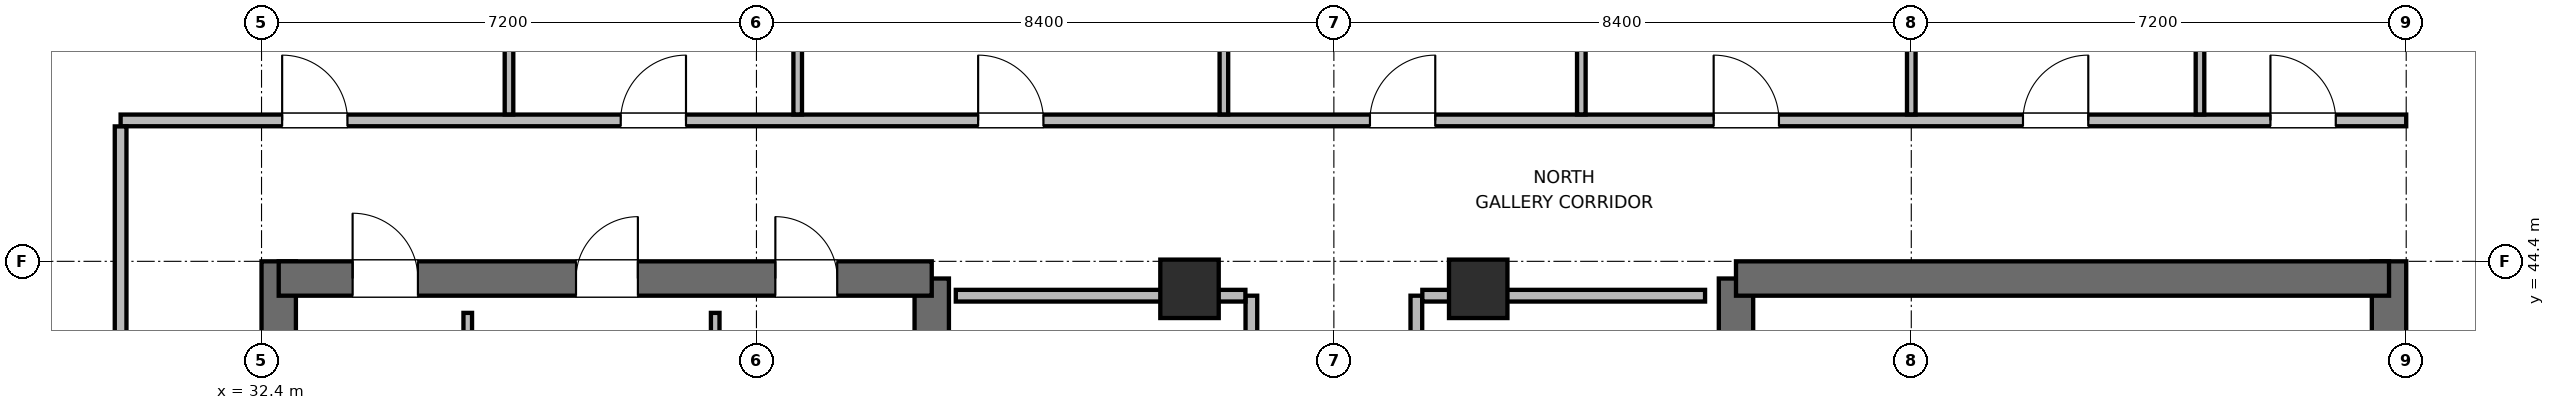
"""IFC4 building model, lengths in metres.
Left out: names, types, materials, properties, quantities, classifications, styles, units other than length and angle.
Written with IfcOpenShell. Run it as: python <this file> out.ifc"""

import sys

from ifc_helpers import new_model, si_unit, direction, frame, frame_2d, origin, origin_2d, place, context, subcontext, project, spatial, rectangle, extrude, element, fill, save


model = new_model("IFC4")
c1 = context("Model", 3, precision=1e-05, world=origin(), true_north=direction((0.0, 1.0)))
c2 = subcontext(c1, "Body", "Model", "MODEL_VIEW")
j1 = project(units=[si_unit("LENGTHUNIT", "METRE"), si_unit("PLANEANGLEUNIT", "RADIAN")], contexts=[c1])
p1 = place(None, origin())
s1 = spatial("IfcSite", under=j1, at=p1, CompositionType="ELEMENT")
p2 = place(p1, origin())
s2 = spatial("IfcBuilding", under=s1, at=p2, CompositionType="ELEMENT")
p3 = place(p2, frame((0.0, 0.0, 278.4)))
s3 = spatial("IfcBuildingStorey", under=s2, at=p3, CompositionType="ELEMENT", Elevation=278.4)
p4 = place(p3, frame((32.65, 27.6, 0.0), z_axis=(0.0, 0.0, 1.0), x_axis=(0.0, 1.0, 0.0)))
e1 = element("IfcWall", 1, at=p4, inside=s3, PredefinedType="SHEAR", context=c2, shape_type="SweptSolid", body=[
    extrude(rectangle(XDim=16.8, YDim=0.5, at=frame_2d((8.4, 0.0))), origin(), (0.0, 0.0, 1.0), 3.9),
])
p5 = place(p3, frame((42.15, 37.8, 0.0), z_axis=(0.0, 0.0, 1.0), x_axis=(0.0, 1.0, 0.0)))
e2 = element("IfcWall", 2, at=p5, inside=s3, PredefinedType="SHEAR", context=c2, shape_type="SweptSolid", body=[
    extrude(rectangle(XDim=6.35, YDim=0.5, at=frame_2d((3.175, 0.0))), origin(), (0.0, 0.0, 1.0), 3.9),
])
p6 = place(p3, frame((32.65, 44.15, 0.0), z_axis=(0.0, 0.0, 1.0), x_axis=(1.0, 0.0, 0.0)))
e3 = element("IfcWall", 3, at=p6, inside=s3, PredefinedType="SHEAR", context=c2, shape_type="SweptSolid", body=[
    extrude(rectangle(XDim=9.5, YDim=0.5, at=frame_2d((4.75, 0.0))), origin(), (0.0, 0.0, 1.0), 3.9),
])
p7 = place(p6, frame((1.075, 0.0, 0.0)))
e4 = element("IfcOpeningElement", 4, at=p7, cuts=e3, PredefinedType="OPENING", context=c2, shape_type="SweptSolid", body=[
    extrude(rectangle(XDim=0.95, YDim=2.04, at=frame_2d((0.475, 1.02))), frame((0.0, 0.26, 0.0), z_axis=(0.0, -1.0, 0.0), x_axis=(1.0, 0.0, 0.0)), (0.0, 0.0, 1.0), 0.52),
])
p8 = place(p6, frame((4.325, 0.0, 0.0)))
e5 = element("IfcOpeningElement", 5, at=p8, cuts=e3, PredefinedType="OPENING", context=c2, shape_type="SweptSolid", body=[
    extrude(rectangle(XDim=0.9, YDim=2.02, at=frame_2d((0.45, 1.01))), frame((0.0, 0.26, 0.0), z_axis=(0.0, -1.0, 0.0), x_axis=(1.0, 0.0, 0.0)), (0.0, 0.0, 1.0), 0.52),
])
p9 = place(p6, frame((7.225, 0.0, 0.0)))
e6 = element("IfcOpeningElement", 6, at=p9, cuts=e3, PredefinedType="OPENING", context=c2, shape_type="SweptSolid", body=[
    extrude(rectangle(XDim=0.9, YDim=2.02, at=frame_2d((0.45, 1.01))), frame((0.0, 0.26, 0.0), z_axis=(0.0, -1.0, 0.0), x_axis=(1.0, 0.0, 0.0)), (0.0, 0.0, 1.0), 0.52),
])
p10 = place(p3, frame((53.85, 38.0, 0.0), z_axis=(0.0, 0.0, 1.0), x_axis=(0.0, 1.0, 0.0)))
e7 = element("IfcWall", 7, at=p10, inside=s3, PredefinedType="SHEAR", context=c2, shape_type="SweptSolid", body=[
    extrude(rectangle(XDim=6.15, YDim=0.5, at=frame_2d((3.075, 0.0))), origin(), (0.0, 0.0, 1.0), 3.9),
])
p11 = place(p3, frame((63.35, 27.6, 0.0), z_axis=(0.0, 0.0, 1.0), x_axis=(0.0, 1.0, 0.0)))
e8 = element("IfcWall", 8, at=p11, inside=s3, PredefinedType="SHEAR", context=c2, shape_type="SweptSolid", body=[
    extrude(rectangle(XDim=16.8, YDim=0.5, at=frame_2d((8.4, 0.0))), origin(), (0.0, 0.0, 1.0), 3.9),
])
p12 = place(p3, frame((53.85, 44.15, 0.0), z_axis=(0.0, 0.0, 1.0), x_axis=(1.0, 0.0, 0.0)))
e9 = element("IfcWall", 9, at=p12, inside=s3, PredefinedType="SHEAR", context=c2, shape_type="SweptSolid", body=[
    extrude(rectangle(XDim=9.5, YDim=0.5, at=frame_2d((4.75, 0.0))), origin(), (0.0, 0.0, 1.0), 3.9),
])
for number, where, z_axis, x_axis in (
    (10, (45.9, 44.0, 0.0), (0.0, 0.0, 1.0), (1.0, 0.0, 0.0)),
    (11, (50.1, 44.0, 0.0), (0.0, 0.0, 1.0), (1.0, 0.0, 0.0)),
):
    element("IfcColumn", number, at=place(p3, frame(where, z_axis=z_axis, x_axis=x_axis)), inside=s3, PredefinedType="COLUMN", context=c2, shape_type="SweptSolid", body=[
        extrude(rectangle(XDim=0.85, YDim=0.85, at=origin_2d()), origin(), (0.0, 0.0, 1.0), 3.9),
    ])
for number, where, z_axis, x_axis in (
    (12, (35.4, 41.095, 0.0), (0.0, 0.0, 1.0), (0.0, 1.0, 0.0)),
    (13, (39.0, 41.095, 0.0), (0.0, 0.0, 1.0), (0.0, 1.0, 0.0)),
):
    element("IfcWall", number, at=place(p3, frame(where, z_axis=z_axis, x_axis=x_axis)), inside=s3, PredefinedType="PARTITIONING", context=c2, shape_type="SweptSolid", body=[
        extrude(rectangle(XDim=2.555, YDim=0.125, at=frame_2d((1.277, 0.0))), origin(), (0.0, 0.0, 1.0), 3.6),
    ])
p13 = place(p3, frame((46.8, 37.9, 0.0), z_axis=(0.0, 0.0, 1.0), x_axis=(0.0, 1.0, 0.0)))
e14 = element("IfcWall", 14, at=p13, inside=s3, PredefinedType="PARTITIONING", context=c2, shape_type="SweptSolid", body=[
    extrude(rectangle(XDim=6.0, YDim=0.17, at=frame_2d((3.0, 0.0))), origin(), (0.0, 0.0, 1.0), 3.6),
])
p14 = place(p13, frame((0.54, 0.0, 0.0)))
e15 = element("IfcOpeningElement", 15, at=p14, cuts=e14, PredefinedType="OPENING", context=c2, shape_type="SweptSolid", body=[
    extrude(rectangle(XDim=0.9, YDim=2.02, at=frame_2d((0.45, 1.01))), frame((0.0, 0.095, 0.0), z_axis=(0.0, -1.0, 0.0), x_axis=(1.0, 0.0, 0.0)), (0.0, 0.0, 1.0), 0.19),
])
p15 = place(p13, frame((2.55, 0.0, 0.0)))
e16 = element("IfcOpeningElement", 16, at=p15, cuts=e14, PredefinedType="OPENING", context=c2, shape_type="SweptSolid", body=[
    extrude(rectangle(XDim=0.9, YDim=2.02, at=frame_2d((0.45, 1.01))), frame((0.0, 0.095, 0.0), z_axis=(0.0, -1.0, 0.0), x_axis=(1.0, 0.0, 0.0)), (0.0, 0.0, 1.0), 0.19),
])
p16 = place(p13, frame((4.56, 0.0, 0.0)))
e17 = element("IfcOpeningElement", 17, at=p16, cuts=e14, PredefinedType="OPENING", context=c2, shape_type="SweptSolid", body=[
    extrude(rectangle(XDim=0.9, YDim=2.02, at=frame_2d((0.45, 1.01))), frame((0.0, 0.095, 0.0), z_axis=(0.0, -1.0, 0.0), x_axis=(1.0, 0.0, 0.0)), (0.0, 0.0, 1.0), 0.19),
])
p17 = place(p3, frame((42.5, 43.9, 0.0), z_axis=(0.0, 0.0, 1.0), x_axis=(1.0, 0.0, 0.0)))
e18 = element("IfcWall", 18, at=p17, inside=s3, PredefinedType="PARTITIONING", context=c2, shape_type="SweptSolid", body=[
    extrude(rectangle(XDim=4.213, YDim=0.17, at=frame_2d((2.106, 0.0))), origin(), (0.0, 0.0, 1.0), 2.685),
])
p18 = place(p3, frame((49.2, 37.9, 0.0), z_axis=(0.0, 0.0, 1.0), x_axis=(0.0, 1.0, 0.0)))
e19 = element("IfcWall", 19, at=p18, inside=s3, PredefinedType="PARTITIONING", context=c2, shape_type="SweptSolid", body=[
    extrude(rectangle(XDim=6.0, YDim=0.17, at=frame_2d((3.0, 0.0))), origin(), (0.0, 0.0, 1.0), 3.6),
])
p19 = place(p18, frame((0.69, 0.0, 0.0)))
e20 = element("IfcOpeningElement", 20, at=p19, cuts=e19, PredefinedType="OPENING", context=c2, shape_type="SweptSolid", body=[
    extrude(rectangle(XDim=0.9, YDim=2.02, at=frame_2d((0.45, 1.01))), frame((0.0, 0.095, 0.0), z_axis=(0.0, -1.0, 0.0), x_axis=(1.0, 0.0, 0.0)), (0.0, 0.0, 1.0), 0.19),
])
p20 = place(p18, frame((3.69, 0.0, 0.0)))
e21 = element("IfcOpeningElement", 21, at=p20, cuts=e19, PredefinedType="OPENING", context=c2, shape_type="SweptSolid", body=[
    extrude(rectangle(XDim=0.9, YDim=2.02, at=frame_2d((0.45, 1.01))), frame((0.0, 0.095, 0.0), z_axis=(0.0, -1.0, 0.0), x_axis=(1.0, 0.0, 0.0)), (0.0, 0.0, 1.0), 0.19),
])
p21 = place(p3, frame((49.287, 43.9, 0.0), z_axis=(0.0, 0.0, 1.0), x_axis=(1.0, 0.0, 0.0)))
e22 = element("IfcWall", 22, at=p21, inside=s3, PredefinedType="PARTITIONING", context=c2, shape_type="SweptSolid", body=[
    extrude(rectangle(XDim=4.113, YDim=0.17, at=frame_2d((2.056, 0.0))), origin(), (0.0, 0.0, 1.0), 2.685),
])
p22 = place(p3, frame((30.35, 46.45, 0.0), z_axis=(0.0, 0.0, 1.0), x_axis=(1.0, 0.0, 0.0)))
e23 = element("IfcWall", 23, at=p22, inside=s3, PredefinedType="PARTITIONING", context=c2, shape_type="SweptSolid", body=[
    extrude(rectangle(XDim=33.25, YDim=0.17, at=frame_2d((16.625, 0.0))), origin(), (0.0, 0.0, 1.0), 3.6),
])
p23 = place(p22, frame((2.35, 0.0, 0.0)))
e24 = element("IfcOpeningElement", 24, at=p23, cuts=e23, PredefinedType="OPENING", context=c2, shape_type="SweptSolid", body=[
    extrude(rectangle(XDim=0.95, YDim=2.04, at=frame_2d((0.475, 1.02))), frame((0.0, 0.095, 0.0), z_axis=(0.0, -1.0, 0.0), x_axis=(1.0, 0.0, 0.0)), (0.0, 0.0, 1.0), 0.19),
])
p24 = place(p22, frame((7.275, 0.0, 0.0)))
e25 = element("IfcOpeningElement", 25, at=p24, cuts=e23, PredefinedType="OPENING", context=c2, shape_type="SweptSolid", body=[
    extrude(rectangle(XDim=0.95, YDim=2.04, at=frame_2d((0.475, 1.02))), frame((0.0, 0.095, 0.0), z_axis=(0.0, -1.0, 0.0), x_axis=(1.0, 0.0, 0.0)), (0.0, 0.0, 1.0), 0.19),
])
p25 = place(p22, frame((12.475, 0.0, 0.0)))
e26 = element("IfcOpeningElement", 26, at=p25, cuts=e23, PredefinedType="OPENING", context=c2, shape_type="SweptSolid", body=[
    extrude(rectangle(XDim=0.95, YDim=2.04, at=frame_2d((0.475, 1.02))), frame((0.0, 0.095, 0.0), z_axis=(0.0, -1.0, 0.0), x_axis=(1.0, 0.0, 0.0)), (0.0, 0.0, 1.0), 0.19),
])
p26 = place(p22, frame((18.175, 0.0, 0.0)))
e27 = element("IfcOpeningElement", 27, at=p26, cuts=e23, PredefinedType="OPENING", context=c2, shape_type="SweptSolid", body=[
    extrude(rectangle(XDim=0.95, YDim=2.04, at=frame_2d((0.475, 1.02))), frame((0.0, 0.095, 0.0), z_axis=(0.0, -1.0, 0.0), x_axis=(1.0, 0.0, 0.0)), (0.0, 0.0, 1.0), 0.19),
])
p27 = place(p22, frame((23.175, 0.0, 0.0)))
e28 = element("IfcOpeningElement", 28, at=p27, cuts=e23, PredefinedType="OPENING", context=c2, shape_type="SweptSolid", body=[
    extrude(rectangle(XDim=0.95, YDim=2.04, at=frame_2d((0.475, 1.02))), frame((0.0, 0.095, 0.0), z_axis=(0.0, -1.0, 0.0), x_axis=(1.0, 0.0, 0.0)), (0.0, 0.0, 1.0), 0.19),
])
p28 = place(p22, frame((27.675, 0.0, 0.0)))
e29 = element("IfcOpeningElement", 29, at=p28, cuts=e23, PredefinedType="OPENING", context=c2, shape_type="SweptSolid", body=[
    extrude(rectangle(XDim=0.95, YDim=2.04, at=frame_2d((0.475, 1.02))), frame((0.0, 0.095, 0.0), z_axis=(0.0, -1.0, 0.0), x_axis=(1.0, 0.0, 0.0)), (0.0, 0.0, 1.0), 0.19),
])
p29 = place(p22, frame((31.275, 0.0, 0.0)))
e30 = element("IfcOpeningElement", 30, at=p29, cuts=e23, PredefinedType="OPENING", context=c2, shape_type="SweptSolid", body=[
    extrude(rectangle(XDim=0.95, YDim=2.04, at=frame_2d((0.475, 1.02))), frame((0.0, 0.095, 0.0), z_axis=(0.0, -1.0, 0.0), x_axis=(1.0, 0.0, 0.0)), (0.0, 0.0, 1.0), 0.19),
])
p30 = place(p3, frame((30.35, 25.637, 0.0), z_axis=(0.0, 0.0, 1.0), x_axis=(0.0, 1.0, 0.0)))
e31 = element("IfcWall", 31, at=p30, inside=s3, PredefinedType="PARTITIONING", context=c2, shape_type="SweptSolid", body=[
    extrude(rectangle(XDim=20.726, YDim=0.17, at=frame_2d((10.363, 0.0))), origin(), (0.0, 0.0, 1.0), 3.6),
])
p31 = place(p30, frame((9.888, 0.0, 0.0)))
e32 = element("IfcOpeningElement", 32, at=p31, cuts=e31, PredefinedType="OPENING", context=c2, shape_type="SweptSolid", body=[
    extrude(rectangle(XDim=0.95, YDim=2.04, at=frame_2d((0.475, 1.02))), frame((0.0, 0.095, 0.0), z_axis=(0.0, -1.0, 0.0), x_axis=(1.0, 0.0, 0.0)), (0.0, 0.0, 1.0), 0.19),
])
p32 = place(p3, frame((36.0, 46.537, 0.0), z_axis=(0.0, 0.0, 1.0), x_axis=(0.0, 1.0, 0.0)))
e33 = element("IfcWall", 33, at=p32, inside=s3, PredefinedType="PARTITIONING", context=c2, shape_type="SweptSolid", body=[
    extrude(rectangle(XDim=6.628, YDim=0.125, at=frame_2d((3.314, 0.0))), origin(), (0.0, 0.0, 1.0), 3.6),
])
p33 = place(p3, frame((40.2, 46.537, 0.0), z_axis=(0.0, 0.0, 1.0), x_axis=(0.0, 1.0, 0.0)))
e34 = element("IfcWall", 34, at=p33, inside=s3, PredefinedType="PARTITIONING", context=c2, shape_type="SweptSolid", body=[
    extrude(rectangle(XDim=6.628, YDim=0.125, at=frame_2d((3.314, 0.0))), origin(), (0.0, 0.0, 1.0), 2.963),
])
p34 = place(p3, frame((46.4, 46.537, 0.0), z_axis=(0.0, 0.0, 1.0), x_axis=(0.0, 1.0, 0.0)))
e35 = element("IfcWall", 35, at=p34, inside=s3, PredefinedType="PARTITIONING", context=c2, shape_type="SweptSolid", body=[
    extrude(rectangle(XDim=5.388, YDim=0.125, at=frame_2d((2.694, 0.0))), origin(), (0.0, 0.0, 1.0), 3.6),
])
p35 = place(p3, frame((51.6, 46.537, 0.0), z_axis=(0.0, 0.0, 1.0), x_axis=(0.0, 1.0, 0.0)))
e36 = element("IfcWall", 36, at=p35, inside=s3, PredefinedType="PARTITIONING", context=c2, shape_type="SweptSolid", body=[
    extrude(rectangle(XDim=3.308, YDim=0.125, at=frame_2d((1.654, 0.0))), origin(), (0.0, 0.0, 1.0), 3.6),
])
p36 = place(p3, frame((56.4, 46.537, 0.0), z_axis=(0.0, 0.0, 1.0), x_axis=(0.0, 1.0, 0.0)))
e37 = element("IfcWall", 37, at=p36, inside=s3, PredefinedType="PARTITIONING", context=c2, shape_type="SweptSolid", body=[
    extrude(rectangle(XDim=6.588, YDim=0.125, at=frame_2d((3.294, 0.0))), origin(), (0.0, 0.0, 1.0), 2.963),
])
p37 = place(p3, frame((60.6, 46.537, 0.0), z_axis=(0.0, 0.0, 1.0), x_axis=(0.0, 1.0, 0.0)))
e38 = element("IfcWall", 38, at=p37, inside=s3, PredefinedType="PARTITIONING", context=c2, shape_type="SweptSolid", body=[
    extrude(rectangle(XDim=6.588, YDim=0.125, at=frame_2d((3.294, 0.0))), origin(), (0.0, 0.0, 1.0), 3.6),
])
p38 = place(p7, origin())
e39 = element("IfcDoor", 39, at=p38, inside=s3, OperationType="SINGLE_SWING_LEFT", PredefinedType="DOOR", context=c2, shape_type="SweptSolid", body=[
    extrude(rectangle(XDim=0.95, YDim=2.04, at=frame_2d((0.475, 1.02))), frame((0.0, 0.025, 0.0), z_axis=(0.0, -1.0, 0.0), x_axis=(1.0, 0.0, 0.0)), (0.0, 0.0, 1.0), 0.05),
])
fill(e4, e39)
p39 = place(p8, origin())
e40 = element("IfcDoor", 40, at=p39, inside=s3, OperationType="SINGLE_SWING_RIGHT", PredefinedType="DOOR", context=c2, shape_type="SweptSolid", body=[
    extrude(rectangle(XDim=0.9, YDim=2.02, at=frame_2d((0.45, 1.01))), frame((0.0, 0.025, 0.0), z_axis=(0.0, -1.0, 0.0), x_axis=(1.0, 0.0, 0.0)), (0.0, 0.0, 1.0), 0.05),
])
fill(e5, e40)
p40 = place(p9, origin())
e41 = element("IfcDoor", 41, at=p40, inside=s3, OperationType="SINGLE_SWING_LEFT", PredefinedType="DOOR", context=c2, shape_type="SweptSolid", body=[
    extrude(rectangle(XDim=0.9, YDim=2.02, at=frame_2d((0.45, 1.01))), frame((0.0, 0.025, 0.0), z_axis=(0.0, -1.0, 0.0), x_axis=(1.0, 0.0, 0.0)), (0.0, 0.0, 1.0), 0.05),
])
fill(e6, e41)
p41 = place(p23, origin())
e42 = element("IfcDoor", 42, at=p41, inside=s3, OperationType="SINGLE_SWING_LEFT", PredefinedType="DOOR", context=c2, shape_type="SweptSolid", body=[
    extrude(rectangle(XDim=0.95, YDim=2.04, at=frame_2d((0.475, 1.02))), frame((0.0, 0.025, 0.0), z_axis=(0.0, -1.0, 0.0), x_axis=(1.0, 0.0, 0.0)), (0.0, 0.0, 1.0), 0.05),
])
fill(e24, e42)
p42 = place(p24, origin())
e43 = element("IfcDoor", 43, at=p42, inside=s3, OperationType="SINGLE_SWING_RIGHT", PredefinedType="DOOR", context=c2, shape_type="SweptSolid", body=[
    extrude(rectangle(XDim=0.95, YDim=2.04, at=frame_2d((0.475, 1.02))), frame((0.0, 0.025, 0.0), z_axis=(0.0, -1.0, 0.0), x_axis=(1.0, 0.0, 0.0)), (0.0, 0.0, 1.0), 0.05),
])
fill(e25, e43)
p43 = place(p25, origin())
e44 = element("IfcDoor", 44, at=p43, inside=s3, OperationType="SINGLE_SWING_LEFT", PredefinedType="DOOR", context=c2, shape_type="SweptSolid", body=[
    extrude(rectangle(XDim=0.95, YDim=2.04, at=frame_2d((0.475, 1.02))), frame((0.0, 0.025, 0.0), z_axis=(0.0, -1.0, 0.0), x_axis=(1.0, 0.0, 0.0)), (0.0, 0.0, 1.0), 0.05),
])
fill(e26, e44)
p44 = place(p26, origin())
e45 = element("IfcDoor", 45, at=p44, inside=s3, OperationType="SINGLE_SWING_RIGHT", PredefinedType="DOOR", context=c2, shape_type="SweptSolid", body=[
    extrude(rectangle(XDim=0.95, YDim=2.04, at=frame_2d((0.475, 1.02))), frame((0.0, 0.025, 0.0), z_axis=(0.0, -1.0, 0.0), x_axis=(1.0, 0.0, 0.0)), (0.0, 0.0, 1.0), 0.05),
])
fill(e27, e45)
p45 = place(p27, origin())
e46 = element("IfcDoor", 46, at=p45, inside=s3, OperationType="SINGLE_SWING_LEFT", PredefinedType="DOOR", context=c2, shape_type="SweptSolid", body=[
    extrude(rectangle(XDim=0.95, YDim=2.04, at=frame_2d((0.475, 1.02))), frame((0.0, 0.025, 0.0), z_axis=(0.0, -1.0, 0.0), x_axis=(1.0, 0.0, 0.0)), (0.0, 0.0, 1.0), 0.05),
])
fill(e28, e46)
p46 = place(p28, origin())
e47 = element("IfcDoor", 47, at=p46, inside=s3, OperationType="SINGLE_SWING_RIGHT", PredefinedType="DOOR", context=c2, shape_type="SweptSolid", body=[
    extrude(rectangle(XDim=0.95, YDim=2.04, at=frame_2d((0.475, 1.02))), frame((0.0, 0.025, 0.0), z_axis=(0.0, -1.0, 0.0), x_axis=(1.0, 0.0, 0.0)), (0.0, 0.0, 1.0), 0.05),
])
fill(e29, e47)
p47 = place(p29, origin())
e48 = element("IfcDoor", 48, at=p47, inside=s3, OperationType="SINGLE_SWING_LEFT", PredefinedType="DOOR", context=c2, shape_type="SweptSolid", body=[
    extrude(rectangle(XDim=0.95, YDim=2.04, at=frame_2d((0.475, 1.02))), frame((0.0, 0.025, 0.0), z_axis=(0.0, -1.0, 0.0), x_axis=(1.0, 0.0, 0.0)), (0.0, 0.0, 1.0), 0.05),
])
fill(e30, e48)
save(model, sys.argv[1])
